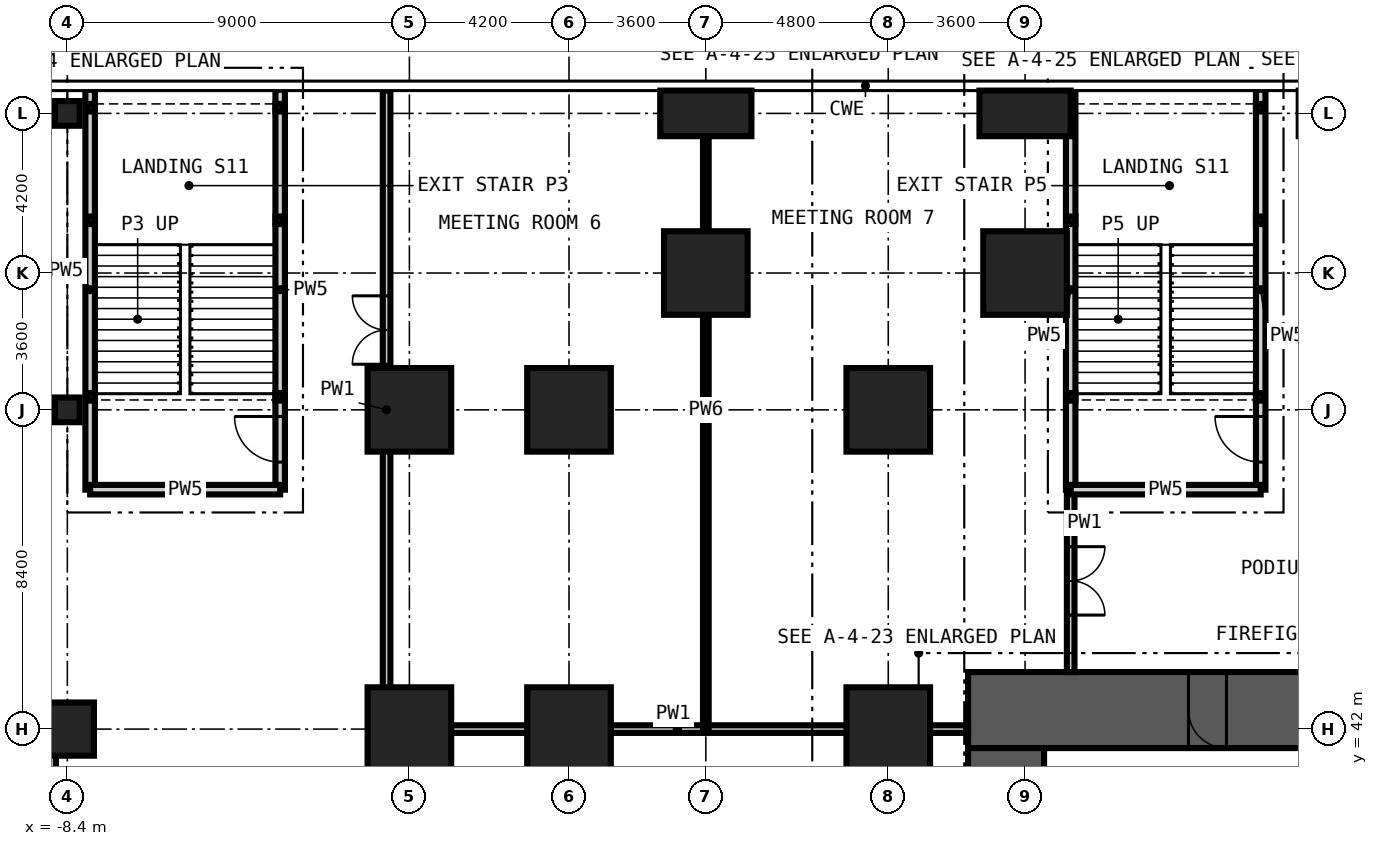
"""IFC4 building model, lengths in metres.
Left out: names, types, materials, properties, quantities, classifications, styles, units other than length and angle.
Written with IfcOpenShell. Run it as: python <this file> out.ifc"""

import sys

from ifc_helpers import new_model, si_unit, direction, frame, frame_2d, origin, origin_2d, place, context, subcontext, project, spatial, rectangle, hollow_rectangle, extrude, element, fill, save


model = new_model("IFC4")
c1 = context("Model", 3, precision=1e-05, world=origin(), true_north=direction((0.0, 1.0)))
c2 = subcontext(c1, "Body", "Model", "MODEL_VIEW")
j1 = project(units=[si_unit("LENGTHUNIT", "METRE"), si_unit("PLANEANGLEUNIT", "RADIAN")], contexts=[c1])
p1 = place(None, origin())
s1 = spatial("IfcSite", under=j1, at=p1, CompositionType="ELEMENT")
p2 = place(p1, origin())
s2 = spatial("IfcBuilding", under=s1, at=p2, CompositionType="ELEMENT")
p3 = place(p2, frame((0.0, 0.0, 12.0)))
s3 = spatial("IfcBuildingStorey", under=s2, at=p3, CompositionType="ELEMENT", Elevation=12.0)
for number, where, z_axis, x_axis in (
    (1, (0.6, 42.0, -0.3), (0.0, 0.0, 1.0), (1.0, 0.0, 0.0)),
    (2, (0.6, 50.4, -0.3), (0.0, 0.0, 1.0), (1.0, 0.0, 0.0)),
    (3, (4.8, 42.0, -0.3), (0.0, 0.0, 1.0), (1.0, 0.0, 0.0)),
    (4, (4.8, 50.4, -0.3), (0.0, 0.0, 1.0), (1.0, 0.0, 0.0)),
    (5, (8.4, 54.0, -0.3), (0.0, 0.0, 1.0), (1.0, 0.0, 0.0)),
):
    element("IfcColumn", number, at=place(p3, frame(where, z_axis=z_axis, x_axis=x_axis)), inside=s3, PredefinedType="COLUMN", context=c2, shape_type="SweptSolid", body=[
        extrude(rectangle(XDim=2.2, YDim=2.2, at=origin_2d()), origin(), (0.0, 0.0, 1.0), 5.0),
    ])
p4 = place(p3, frame((8.4, 58.2, -0.3), z_axis=(0.0, 0.0, 1.0), x_axis=(1.0, 0.0, 0.0)))
e6 = element("IfcColumn", 6, at=p4, inside=s3, PredefinedType="COLUMN", context=c2, shape_type="SweptSolid", body=[
    extrude(rectangle(XDim=2.4, YDim=1.2, at=origin_2d()), origin(), (0.0, 0.0, 1.0), 5.0),
])
for number, where, z_axis, x_axis in (
    (7, (13.2, 42.0, -0.3), (0.0, 0.0, 1.0), (1.0, 0.0, 0.0)),
    (8, (13.2, 50.4, -0.3), (0.0, 0.0, 1.0), (1.0, 0.0, 0.0)),
    (9, (16.8, 54.0, -0.3), (0.0, 0.0, 1.0), (1.0, 0.0, 0.0)),
):
    element("IfcColumn", number, at=place(p3, frame(where, z_axis=z_axis, x_axis=x_axis)), inside=s3, PredefinedType="COLUMN", context=c2, shape_type="SweptSolid", body=[
        extrude(rectangle(XDim=2.2, YDim=2.2, at=origin_2d()), origin(), (0.0, 0.0, 1.0), 5.0),
    ])
p5 = place(p3, frame((16.8, 58.2, -0.3), z_axis=(0.0, 0.0, 1.0), x_axis=(1.0, 0.0, 0.0)))
e10 = element("IfcColumn", 10, at=p5, inside=s3, PredefinedType="COLUMN", context=c2, shape_type="SweptSolid", body=[
    extrude(rectangle(XDim=2.4, YDim=1.2, at=origin_2d()), origin(), (0.0, 0.0, 1.0), 5.0),
])
p6 = place(p3, frame((-8.4, 42.0, -0.3), z_axis=(0.0, 0.0, 1.0), x_axis=(1.0, 0.0, 0.0)))
e11 = element("IfcColumn", 11, at=p6, inside=s3, PredefinedType="COLUMN", context=c2, shape_type="SweptSolid", body=[
    extrude(rectangle(XDim=1.4, YDim=1.4, at=origin_2d()), origin(), (0.0, 0.0, 1.0), 5.0),
])
for number, where, z_axis, x_axis in (
    (12, (-8.4, 50.4, -0.3), (0.0, 0.0, 1.0), (1.0, 0.0, 0.0)),
    (13, (-8.4, 58.2, -0.3), (0.0, 0.0, 1.0), (1.0, 0.0, 0.0)),
):
    element("IfcColumn", number, at=place(p3, frame(where, z_axis=z_axis, x_axis=x_axis)), inside=s3, PredefinedType="COLUMN", context=c2, shape_type="SweptSolid", body=[
        extrude(rectangle(XDim=0.65, YDim=0.65, at=origin_2d()), origin(), (0.0, 0.0, 1.0), 5.0),
    ])
p7 = place(p3, frame((43.5, 42.5, -0.3), z_axis=(0.0, 0.0, 1.0), x_axis=(-1.0, 0.0, 0.0)))
e14 = element("IfcWall", 14, at=p7, inside=s3, PredefinedType="SHEAR", context=c2, shape_type="SweptSolid", body=[
    extrude(rectangle(XDim=28.2, YDim=2.0, at=frame_2d((14.1, 0.0))), origin(), (0.0, 0.0, 1.0), 5.0),
])
p8 = place(p7, frame((21.4, 0.0, 0.3)))
e15 = element("IfcOpeningElement", 15, at=p8, cuts=e14, PredefinedType="OPENING", context=c2, shape_type="SweptSolid", body=[
    extrude(rectangle(XDim=1.0, YDim=2.1, at=frame_2d((0.5, 1.05))), frame((0.0, 1.01, 0.0), z_axis=(0.0, -1.0, 0.0), x_axis=(1.0, 0.0, 0.0)), (0.0, 0.0, 1.0), 2.02),
])
p9 = place(p7, frame((11.4, 0.0, 0.3)))
e16 = element("IfcOpeningElement", 16, at=p9, cuts=e14, PredefinedType="OPENING", context=c2, shape_type="SweptSolid", body=[
    extrude(rectangle(XDim=1.2, YDim=2.2, at=frame_2d((0.6, 1.1))), frame((0.0, 1.01, 0.0), z_axis=(0.0, -1.0, 0.0), x_axis=(1.0, 0.0, 0.0)), (0.0, 0.0, 1.0), 2.02),
])
p10 = place(p3, frame((16.3, 41.5, -0.3), z_axis=(0.0, 0.0, 1.0), x_axis=(0.0, -1.0, 0.0)))
e17 = element("IfcWall", 17, at=p10, inside=s3, PredefinedType="SHEAR", context=c2, shape_type="SweptSolid", body=[
    extrude(rectangle(XDim=24.2, YDim=2.0, at=frame_2d((12.1, 0.0))), origin(), (0.0, 0.0, 1.0), 5.0),
])
p11 = place(p10, frame((11.2, 0.0, 0.3)))
e18 = element("IfcOpeningElement", 18, at=p11, cuts=e17, PredefinedType="OPENING", context=c2, shape_type="SweptSolid", body=[
    extrude(rectangle(XDim=1.8, YDim=2.2, at=frame_2d((0.9, 1.1))), frame((0.0, 1.01, 0.0), z_axis=(0.0, -1.0, 0.0), x_axis=(1.0, 0.0, 0.0)), (0.0, 0.0, 1.0), 2.02),
])
p12 = place(p10, frame((20.0, 0.0, 0.3)))
e19 = element("IfcOpeningElement", 19, at=p12, cuts=e17, PredefinedType="OPENING", context=c2, shape_type="SweptSolid", body=[
    extrude(rectangle(XDim=1.0, YDim=2.1, at=frame_2d((0.5, 1.05))), frame((0.0, 1.01, 0.0), z_axis=(0.0, -1.0, 0.0), x_axis=(1.0, 0.0, 0.0)), (0.0, 0.0, 1.0), 2.02),
])
p13 = place(p10, frame((5.3, 0.0, 0.3)))
e20 = element("IfcOpeningElement", 20, at=p13, cuts=e17, PredefinedType="OPENING", context=c2, shape_type="SweptSolid", body=[
    extrude(rectangle(XDim=1.0, YDim=2.1, at=frame_2d((0.5, 1.05))), frame((0.0, 1.01, 0.0), z_axis=(0.0, -1.0, 0.0), x_axis=(1.0, 0.0, 0.0)), (0.0, 0.0, 1.0), 2.02),
])
p14 = place(p3, frame((-8.85, 42.0, 0.0), z_axis=(0.0, 0.0, 1.0), x_axis=(0.0, -1.0, 0.0)))
e21 = element("IfcWall", 21, at=p14, inside=s3, PredefinedType="PARTITIONING", context=c2, shape_type="SweptSolid", body=[
    extrude(rectangle(XDim=33.6, YDim=0.3, at=frame_2d((16.8, 0.0))), origin(), (0.0, 0.0, 1.0), 4.7),
])
p15 = place(p3, frame((0.0, 42.0, 0.0), z_axis=(0.0, 0.0, 1.0), x_axis=(0.0, 1.0, 0.0)))
e22 = element("IfcWall", 22, at=p15, inside=s3, PredefinedType="PARTITIONING", context=c2, shape_type="SweptSolid", body=[
    extrude(rectangle(XDim=16.8, YDim=0.2, at=frame_2d((8.4, 0.0))), origin(), (0.0, 0.0, 1.0), 4.7),
])
p16 = place(p15, frame((9.6, 0.0, 0.0)))
e23 = element("IfcOpeningElement", 23, at=p16, cuts=e22, PredefinedType="OPENING", context=c2, shape_type="SweptSolid", body=[
    extrude(rectangle(XDim=1.8, YDim=2.4, at=frame_2d((0.9, 1.2))), frame((0.0, 0.11, 0.0), z_axis=(0.0, -1.0, 0.0), x_axis=(1.0, 0.0, 0.0)), (0.0, 0.0, 1.0), 0.22),
])
p17 = place(p3, frame((18.0, 48.3, 0.0), z_axis=(0.0, 0.0, 1.0), x_axis=(0.0, -1.0, 0.0)))
e24 = element("IfcWall", 24, at=p17, inside=s3, PredefinedType="PARTITIONING", context=c2, shape_type="SweptSolid", body=[
    extrude(rectangle(XDim=4.8, YDim=0.2, at=frame_2d((2.4, 0.0))), origin(), (0.0, 0.0, 1.0), 4.7),
])
p18 = place(p17, frame((1.5, 0.0, 0.0)))
e25 = element("IfcOpeningElement", 25, at=p18, cuts=e24, PredefinedType="OPENING", context=c2, shape_type="SweptSolid", body=[
    extrude(rectangle(XDim=1.8, YDim=2.4, at=frame_2d((0.9, 1.2))), frame((0.0, 0.11, 0.0), z_axis=(0.0, -1.0, 0.0), x_axis=(1.0, 0.0, 0.0)), (0.0, 0.0, 1.0), 0.22),
])
p19 = place(p3, frame((15.3, 42.0, 0.0), z_axis=(0.0, 0.0, 1.0), x_axis=(-1.0, 0.0, 0.0)))
e26 = element("IfcWall", 26, at=p19, inside=s3, PredefinedType="PARTITIONING", context=c2, shape_type="SweptSolid", body=[
    extrude(rectangle(XDim=15.3, YDim=0.2, at=frame_2d((7.65, 0.0))), origin(), (0.0, 0.0, 1.0), 4.7),
])
p20 = place(p3, frame((8.4, 42.0, 0.0), z_axis=(0.0, 0.0, 1.0), x_axis=(0.0, 1.0, 0.0)))
e27 = element("IfcWall", 27, at=p20, inside=s3, PredefinedType="PARTITIONING", context=c2, shape_type="SweptSolid", body=[
    extrude(rectangle(XDim=16.8, YDim=0.15, at=frame_2d((8.4, 0.0))), origin(), (0.0, 0.0, 1.0), 4.7),
])
p21 = place(p3, frame((-7.8, 48.3, 0.0), z_axis=(0.0, 0.0, 1.0), x_axis=(0.0, 1.0, 0.0)))
e28 = element("IfcWall", 28, at=p21, inside=s3, PredefinedType="PARTITIONING", context=c2, shape_type="SweptSolid", body=[
    extrude(rectangle(XDim=10.523, YDim=0.25, at=frame_2d((5.261, 0.0))), origin(), (0.0, 0.0, 1.0), 4.7),
])
p22 = place(p3, frame((-2.8, 48.3, 0.0), z_axis=(0.0, 0.0, 1.0), x_axis=(0.0, 1.0, 0.0)))
e29 = element("IfcWall", 29, at=p22, inside=s3, PredefinedType="PARTITIONING", context=c2, shape_type="SweptSolid", body=[
    extrude(rectangle(XDim=10.523, YDim=0.25, at=frame_2d((5.261, 0.0))), origin(), (0.0, 0.0, 1.0), 4.7),
])
p23 = place(p22, frame((0.725, 0.0, 0.0)))
e30 = element("IfcOpeningElement", 30, at=p23, cuts=e29, PredefinedType="OPENING", context=c2, shape_type="SweptSolid", body=[
    extrude(rectangle(XDim=1.2, YDim=2.2, at=frame_2d((0.6, 1.1))), frame((0.0, 0.135, 0.0), z_axis=(0.0, -1.0, 0.0), x_axis=(1.0, 0.0, 0.0)), (0.0, 0.0, 1.0), 0.27),
])
p24 = place(p3, frame((18.0, 48.3, 0.0), z_axis=(0.0, 0.0, 1.0), x_axis=(0.0, 1.0, 0.0)))
e31 = element("IfcWall", 31, at=p24, inside=s3, PredefinedType="PARTITIONING", context=c2, shape_type="SweptSolid", body=[
    extrude(rectangle(XDim=10.523, YDim=0.25, at=frame_2d((5.261, 0.0))), origin(), (0.0, 0.0, 1.0), 4.7),
])
p25 = place(p3, frame((23.0, 48.3, 0.0), z_axis=(0.0, 0.0, 1.0), x_axis=(0.0, 1.0, 0.0)))
e32 = element("IfcWall", 32, at=p25, inside=s3, PredefinedType="PARTITIONING", context=c2, shape_type="SweptSolid", body=[
    extrude(rectangle(XDim=10.523, YDim=0.25, at=frame_2d((5.261, 0.0))), origin(), (0.0, 0.0, 1.0), 4.7),
])
p26 = place(p25, frame((0.725, 0.0, 0.0)))
e33 = element("IfcOpeningElement", 33, at=p26, cuts=e32, PredefinedType="OPENING", context=c2, shape_type="SweptSolid", body=[
    extrude(rectangle(XDim=1.2, YDim=2.2, at=frame_2d((0.6, 1.1))), frame((0.0, 0.135, 0.0), z_axis=(0.0, -1.0, 0.0), x_axis=(1.0, 0.0, 0.0)), (0.0, 0.0, 1.0), 0.27),
])
for number, where, z_axis, x_axis in (
    (34, (-7.8, 48.3, 0.0), (0.0, 0.0, 1.0), (1.0, 0.0, 0.0)),
    (35, (18.0, 48.3, 0.0), (0.0, 0.0, 1.0), (1.0, 0.0, 0.0)),
):
    element("IfcWall", number, at=place(p3, frame(where, z_axis=z_axis, x_axis=x_axis)), inside=s3, PredefinedType="PARTITIONING", context=c2, shape_type="SweptSolid", body=[
        extrude(rectangle(XDim=5.0, YDim=0.25, at=frame_2d((2.5, 0.0))), origin(), (0.0, 0.0, 1.0), 4.7),
    ])
for number, where, z_axis, x_axis in (
    (36, (-7.775, 50.742, -0.3), (0.0, 0.0, 1.0), (1.0, 0.0, 0.0)),
    (37, (-2.825, 50.742, -0.3), (0.0, 0.0, 1.0), (1.0, 0.0, 0.0)),
    (38, (-7.775, 55.387, -0.3), (0.0, 0.0, 1.0), (1.0, 0.0, 0.0)),
    (39, (-2.825, 55.387, -0.3), (0.0, 0.0, 1.0), (1.0, 0.0, 0.0)),
    (40, (-7.775, 58.35, -0.3), (0.0, 0.0, 1.0), (1.0, 0.0, 0.0)),
    (41, (-2.825, 58.35, -0.3), (0.0, 0.0, 1.0), (1.0, 0.0, 0.0)),
    (42, (18.025, 50.742, -0.3), (0.0, 0.0, 1.0), (1.0, 0.0, 0.0)),
    (43, (22.975, 50.742, -0.3), (0.0, 0.0, 1.0), (1.0, 0.0, 0.0)),
    (44, (18.025, 55.387, -0.3), (0.0, 0.0, 1.0), (1.0, 0.0, 0.0)),
    (45, (22.975, 55.387, -0.3), (0.0, 0.0, 1.0), (1.0, 0.0, 0.0)),
    (46, (22.975, 58.35, -0.3), (0.0, 0.0, 1.0), (1.0, 0.0, 0.0)),
):
    element("IfcColumn", number, at=place(p3, frame(where, z_axis=z_axis, x_axis=x_axis)), inside=s3, PredefinedType="COLUMN", context=c2, shape_type="SweptSolid", body=[
        extrude(hollow_rectangle(XDim=0.2, YDim=0.2, WallThickness=0.01, at=origin_2d()), origin(), (0.0, 0.0, 1.0), 5.0),
    ])
p27 = place(p23, origin())
e47 = element("IfcDoor", 47, at=p27, inside=s3, OperationType="SINGLE_SWING_RIGHT", PredefinedType="DOOR", context=c2, shape_type="SweptSolid", body=[
    extrude(rectangle(XDim=1.2, YDim=2.2, at=frame_2d((0.6, 1.1))), frame((0.0, 0.025, 0.0), z_axis=(0.0, -1.0, 0.0), x_axis=(1.0, 0.0, 0.0)), (0.0, 0.0, 1.0), 0.05),
])
fill(e30, e47)
p28 = place(p26, origin())
e48 = element("IfcDoor", 48, at=p28, inside=s3, OperationType="SINGLE_SWING_RIGHT", PredefinedType="DOOR", context=c2, shape_type="SweptSolid", body=[
    extrude(rectangle(XDim=1.2, YDim=2.2, at=frame_2d((0.6, 1.1))), frame((0.0, 0.025, 0.0), z_axis=(0.0, -1.0, 0.0), x_axis=(1.0, 0.0, 0.0)), (0.0, 0.0, 1.0), 0.05),
])
fill(e33, e48)
p29 = place(p8, origin())
e49 = element("IfcDoor", 49, at=p29, inside=s3, OperationType="SINGLE_SWING_LEFT", PredefinedType="DOOR", context=c2, shape_type="SweptSolid", body=[
    extrude(rectangle(XDim=1.0, YDim=2.1, at=frame_2d((0.5, 1.05))), frame((0.0, 0.025, 0.0), z_axis=(0.0, -1.0, 0.0), x_axis=(1.0, 0.0, 0.0)), (0.0, 0.0, 1.0), 0.05),
])
fill(e15, e49)
p30 = place(p16, origin())
e50 = element("IfcDoor", 50, at=p30, inside=s3, OperationType="DOUBLE_DOOR_DOUBLE_SWING", PredefinedType="DOOR", context=c2, shape_type="SweptSolid", body=[
    extrude(rectangle(XDim=1.8, YDim=2.4, at=frame_2d((0.9, 1.2))), frame((0.0, 0.025, 0.0), z_axis=(0.0, -1.0, 0.0), x_axis=(1.0, 0.0, 0.0)), (0.0, 0.0, 1.0), 0.05),
])
fill(e23, e50)
p31 = place(p18, origin())
e51 = element("IfcDoor", 51, at=p31, inside=s3, OperationType="DOUBLE_DOOR_DOUBLE_SWING", PredefinedType="DOOR", context=c2, shape_type="SweptSolid", body=[
    extrude(rectangle(XDim=1.8, YDim=2.4, at=frame_2d((0.9, 1.2))), frame((0.0, 0.025, 0.0), z_axis=(0.0, -1.0, 0.0), x_axis=(1.0, 0.0, 0.0)), (0.0, 0.0, 1.0), 0.05),
])
fill(e25, e51)
save(model, sys.argv[1])
